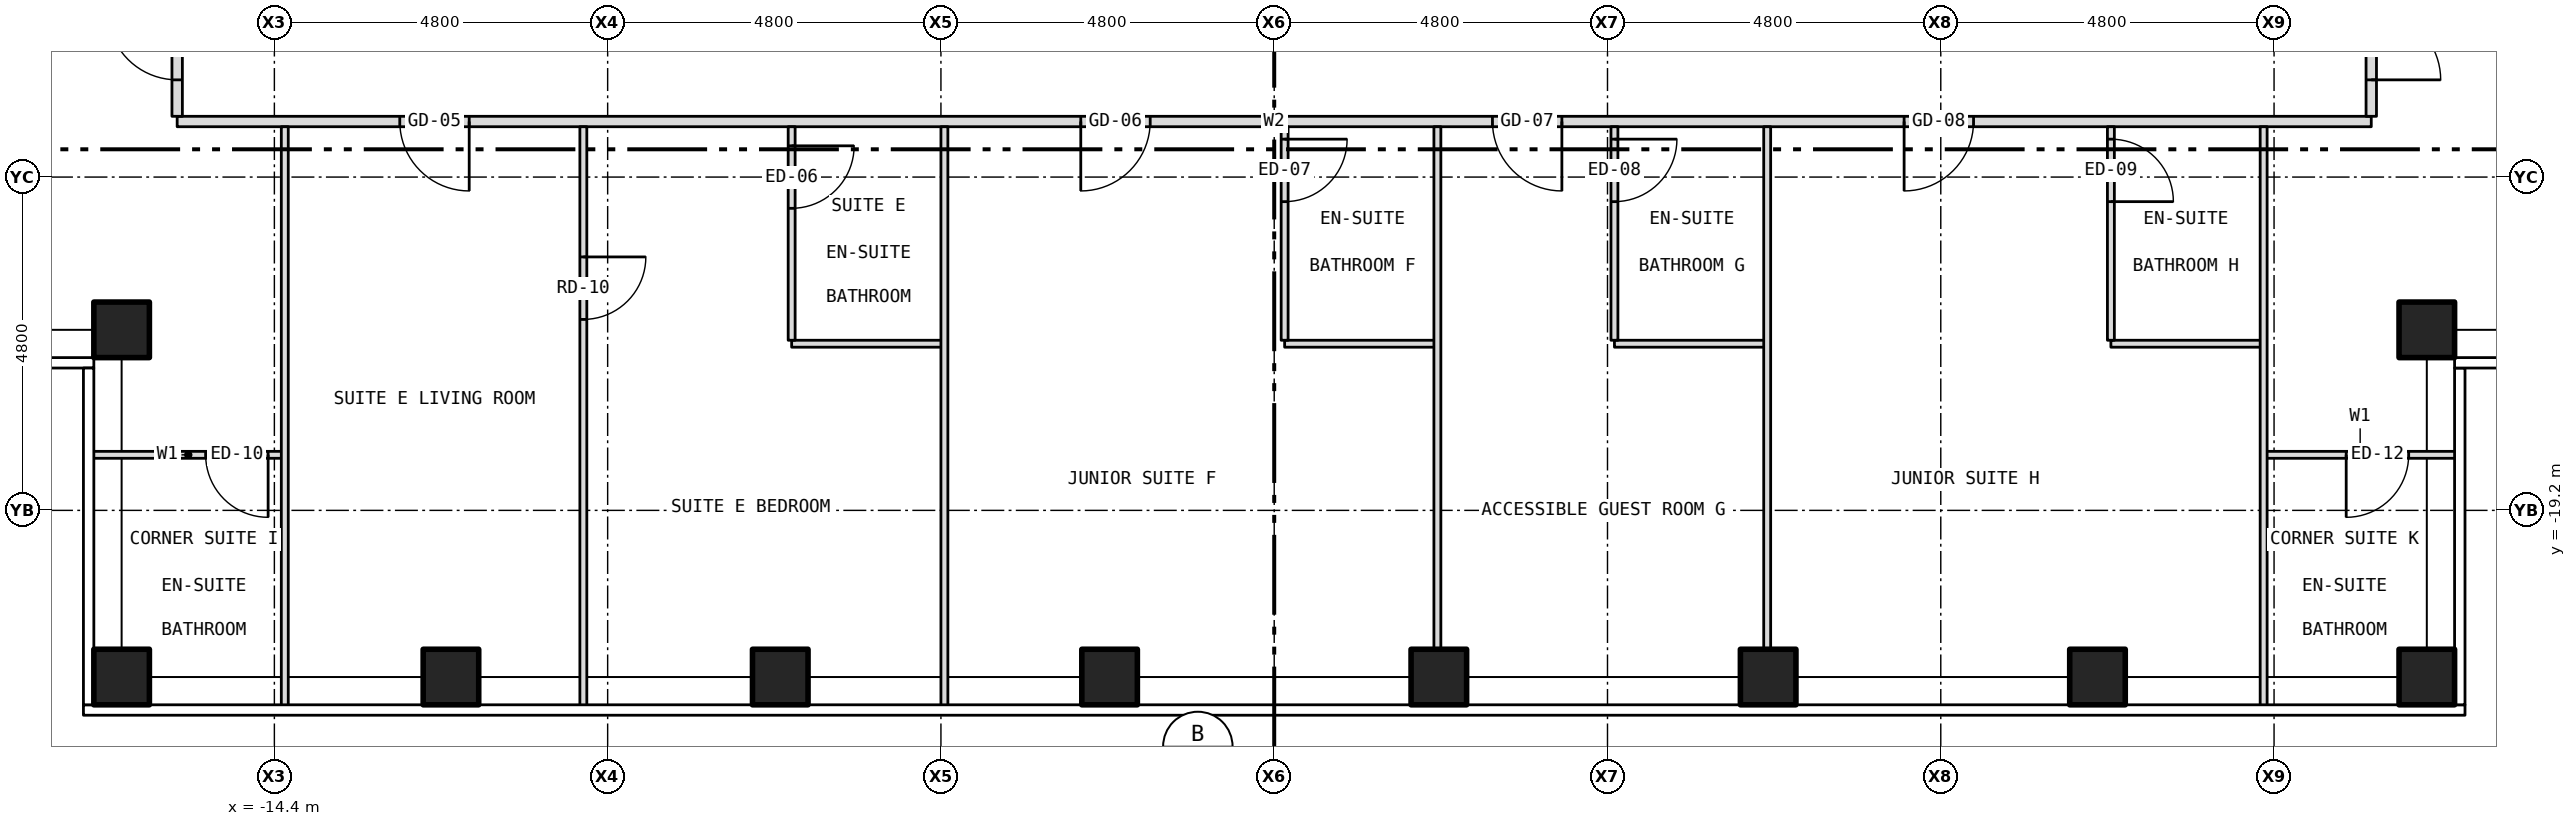
"""IFC4 building model, lengths in metres.
Left out: names, types, materials, properties, quantities, classifications, styles, units other than length and angle.
Written with IfcOpenShell. Run it as: python <this file> out.ifc"""

import sys

from ifc_helpers import new_model, si_unit, direction, frame, frame_2d, origin, origin_2d, place, context, subcontext, project, spatial, rectangle, hollow_rectangle, extrude, element, fill, save


model = new_model("IFC4")
c1 = context("Model", 3, precision=1e-05, world=origin(), true_north=direction((0.0, 1.0)))
c2 = subcontext(c1, "Body", "Model", "MODEL_VIEW")
j1 = project(units=[si_unit("LENGTHUNIT", "METRE"), si_unit("PLANEANGLEUNIT", "RADIAN")], contexts=[c1])
p1 = place(None, origin())
s1 = spatial("IfcSite", under=j1, at=p1, CompositionType="ELEMENT")
p2 = place(p1, origin())
s2 = spatial("IfcBuilding", under=s1, at=p2, CompositionType="ELEMENT")
p3 = place(p2, frame((0.0, 0.0, 162.0)))
s3 = spatial("IfcBuildingStorey", under=s2, at=p3, CompositionType="ELEMENT", Elevation=162.0)
for number, where, z_axis, x_axis in (
    (1, (-16.6, -21.6, -0.15), (0.0, 0.0, 1.0), (1.0, 0.0, 0.0)),
    (2, (-11.857, -21.6, -0.15), (0.0, 0.0, 1.0), (1.0, 0.0, 0.0)),
    (3, (-7.114, -21.6, -0.15), (0.0, 0.0, 1.0), (1.0, 0.0, 0.0)),
    (4, (-2.371, -21.6, -0.15), (0.0, 0.0, 1.0), (1.0, 0.0, 0.0)),
    (5, (2.371, -21.6, -0.15), (0.0, 0.0, 1.0), (1.0, 0.0, 0.0)),
    (6, (7.114, -21.6, -0.15), (0.0, 0.0, 1.0), (1.0, 0.0, 0.0)),
    (7, (11.857, -21.6, -0.15), (0.0, 0.0, 1.0), (1.0, 0.0, 0.0)),
    (8, (16.6, -21.6, -0.15), (0.0, 0.0, 1.0), (1.0, 0.0, 0.0)),
    (9, (-16.6, -16.6, -0.15), (0.0, 0.0, 1.0), (1.0, 0.0, 0.0)),
    (10, (16.6, -16.6, -0.15), (0.0, 0.0, 1.0), (1.0, 0.0, 0.0)),
):
    element("IfcColumn", number, at=place(p3, frame(where, z_axis=z_axis, x_axis=x_axis)), inside=s3, PredefinedType="COLUMN", context=c2, shape_type="SweptSolid", body=[
        extrude(hollow_rectangle(XDim=0.8, YDim=0.8, WallThickness=0.045, at=origin_2d()), origin(), (0.0, 0.0, 1.0), 3.5),
    ])
p4 = place(p3, frame((-17.03, -18.4, 0.0), z_axis=(0.0, 0.0, 1.0), x_axis=(1.0, 0.0, 0.0)))
e11 = element("IfcWall", 11, at=p4, inside=s3, PredefinedType="PARTITIONING", context=c2, shape_type="SweptSolid", body=[
    extrude(rectangle(XDim=2.78, YDim=0.1, at=frame_2d((1.39, 0.0))), origin(), (0.0, 0.0, 1.0), 3.35),
])
p5 = place(p4, frame((1.64, 0.0, 0.0)))
e12 = element("IfcOpeningElement", 12, at=p5, cuts=e11, PredefinedType="OPENING", context=c2, shape_type="SweptSolid", body=[
    extrude(rectangle(XDim=0.9, YDim=2.1, at=frame_2d((0.45, 1.05))), frame((0.0, 0.062, 0.0), z_axis=(0.0, -1.0, 0.0), x_axis=(1.0, 0.0, 0.0)), (0.0, 0.0, 1.0), 0.124),
])
p6 = place(p3, frame((14.25, -18.4, 0.0), z_axis=(0.0, 0.0, 1.0), x_axis=(1.0, 0.0, 0.0)))
e13 = element("IfcWall", 13, at=p6, inside=s3, PredefinedType="PARTITIONING", context=c2, shape_type="SweptSolid", body=[
    extrude(rectangle(XDim=2.78, YDim=0.1, at=frame_2d((1.39, 0.0))), origin(), (0.0, 0.0, 1.0), 3.35),
])
p7 = place(p6, frame((1.189, 0.0, 0.0)))
e14 = element("IfcOpeningElement", 14, at=p7, cuts=e13, PredefinedType="OPENING", context=c2, shape_type="SweptSolid", body=[
    extrude(rectangle(XDim=0.9, YDim=2.1, at=frame_2d((0.45, 1.05))), frame((0.0, 0.062, 0.0), z_axis=(0.0, -1.0, 0.0), x_axis=(1.0, 0.0, 0.0)), (0.0, 0.0, 1.0), 0.124),
])
p8 = place(p3, frame((-6.95, -16.8, 0.0), z_axis=(0.0, 0.0, 1.0), x_axis=(1.0, 0.0, 0.0)))
e15 = element("IfcWall", 15, at=p8, inside=s3, PredefinedType="PARTITIONING", context=c2, shape_type="SweptSolid", body=[
    extrude(rectangle(XDim=2.2, YDim=0.1, at=frame_2d((1.1, 0.0))), origin(), (0.0, 0.0, 1.0), 3.35),
])
for number, where, z_axis, x_axis in (
    (16, (0.15, -16.8, 0.0), (0.0, 0.0, 1.0), (1.0, 0.0, 0.0)),
    (17, (4.9, -16.8, 0.0), (0.0, 0.0, 1.0), (1.0, 0.0, 0.0)),
):
    element("IfcWall", number, at=place(p3, frame(where, z_axis=z_axis, x_axis=x_axis)), inside=s3, PredefinedType="PARTITIONING", context=c2, shape_type="SweptSolid", body=[
        extrude(rectangle(XDim=2.2, YDim=0.1, at=frame_2d((1.1, 0.0))), origin(), (0.0, 0.0, 1.0), 3.35),
    ])
p9 = place(p3, frame((12.05, -16.8, 0.0), z_axis=(0.0, 0.0, 1.0), x_axis=(1.0, 0.0, 0.0)))
e18 = element("IfcWall", 18, at=p9, inside=s3, PredefinedType="PARTITIONING", context=c2, shape_type="SweptSolid", body=[
    extrude(rectangle(XDim=2.2, YDim=0.1, at=frame_2d((1.1, 0.0))), origin(), (0.0, 0.0, 1.0), 3.35),
])
p10 = place(p3, frame((-15.8, -13.6, 0.0), z_axis=(0.0, 0.0, 1.0), x_axis=(1.0, 0.0, 0.0)))
e19 = element("IfcWall", 19, at=p10, inside=s3, PredefinedType="PARTITIONING", context=c2, shape_type="SweptSolid", body=[
    extrude(rectangle(XDim=31.6, YDim=0.15, at=frame_2d((15.8, 0.0))), origin(), (0.0, 0.0, 1.0), 3.35),
])
p11 = place(p10, frame((3.206, 0.0, 0.0)))
e20 = element("IfcOpeningElement", 20, at=p11, cuts=e19, PredefinedType="OPENING", context=c2, shape_type="SweptSolid", body=[
    extrude(rectangle(XDim=1.0, YDim=2.1, at=frame_2d((0.5, 1.05))), frame((0.0, 0.087, 0.0), z_axis=(0.0, -1.0, 0.0), x_axis=(1.0, 0.0, 0.0)), (0.0, 0.0, 1.0), 0.174),
])
p12 = place(p10, frame((13.014, 0.0, 0.0)))
e21 = element("IfcOpeningElement", 21, at=p12, cuts=e19, PredefinedType="OPENING", context=c2, shape_type="SweptSolid", body=[
    extrude(rectangle(XDim=1.0, YDim=2.1, at=frame_2d((0.5, 1.05))), frame((0.0, 0.087, 0.0), z_axis=(0.0, -1.0, 0.0), x_axis=(1.0, 0.0, 0.0)), (0.0, 0.0, 1.0), 0.174),
])
p13 = place(p10, frame((18.943, 0.0, 0.0)))
e22 = element("IfcOpeningElement", 22, at=p13, cuts=e19, PredefinedType="OPENING", context=c2, shape_type="SweptSolid", body=[
    extrude(rectangle(XDim=1.0, YDim=2.1, at=frame_2d((0.5, 1.05))), frame((0.0, 0.087, 0.0), z_axis=(0.0, -1.0, 0.0), x_axis=(1.0, 0.0, 0.0)), (0.0, 0.0, 1.0), 0.174),
])
p14 = place(p10, frame((24.872, 0.0, 0.0)))
e23 = element("IfcOpeningElement", 23, at=p14, cuts=e19, PredefinedType="OPENING", context=c2, shape_type="SweptSolid", body=[
    extrude(rectangle(XDim=1.0, YDim=2.1, at=frame_2d((0.5, 1.05))), frame((0.0, 0.087, 0.0), z_axis=(0.0, -1.0, 0.0), x_axis=(1.0, 0.0, 0.0)), (0.0, 0.0, 1.0), 0.174),
])
p15 = place(p3, frame((-15.8, -13.525, 0.0), z_axis=(0.0, 0.0, 1.0), x_axis=(0.0, 1.0, 0.0)))
e24 = element("IfcWall", 24, at=p15, inside=s3, PredefinedType="PARTITIONING", context=c2, shape_type="SweptSolid", body=[
    extrude(rectangle(XDim=2.605, YDim=0.15, at=frame_2d((1.302, 0.0))), origin(), (0.0, 0.0, 1.0), 3.35),
])
p16 = place(p15, frame((0.525, 0.0, 0.0)))
e25 = element("IfcOpeningElement", 25, at=p16, cuts=e24, PredefinedType="OPENING", context=c2, shape_type="SweptSolid", body=[
    extrude(rectangle(XDim=1.0, YDim=2.1, at=frame_2d((0.5, 1.05))), frame((0.0, 0.087, 0.0), z_axis=(0.0, -1.0, 0.0), x_axis=(1.0, 0.0, 0.0)), (0.0, 0.0, 1.0), 0.174),
])
p17 = place(p3, frame((-14.25, -22.03, 0.0), z_axis=(0.0, 0.0, 1.0), x_axis=(0.0, 1.0, 0.0)))
e26 = element("IfcWall", 26, at=p17, inside=s3, PredefinedType="PARTITIONING", context=c2, shape_type="SweptSolid", body=[
    extrude(rectangle(XDim=8.355, YDim=0.1, at=frame_2d((4.177, 0.0))), origin(), (0.0, 0.0, 1.0), 2.817),
])
p18 = place(p3, frame((-9.95, -22.03, 0.0), z_axis=(0.0, 0.0, 1.0), x_axis=(0.0, 1.0, 0.0)))
e27 = element("IfcWall", 27, at=p18, inside=s3, PredefinedType="PARTITIONING", context=c2, shape_type="SweptSolid", body=[
    extrude(rectangle(XDim=8.355, YDim=0.1, at=frame_2d((4.177, 0.0))), origin(), (0.0, 0.0, 1.0), 3.35),
])
p19 = place(p18, frame((5.58, 0.0, 0.0)))
e28 = element("IfcOpeningElement", 28, at=p19, cuts=e27, PredefinedType="OPENING", context=c2, shape_type="SweptSolid", body=[
    extrude(rectangle(XDim=0.9, YDim=2.1, at=frame_2d((0.45, 1.05))), frame((0.0, 0.062, 0.0), z_axis=(0.0, -1.0, 0.0), x_axis=(1.0, 0.0, 0.0)), (0.0, 0.0, 1.0), 0.124),
])
p20 = place(p3, frame((-6.95, -16.75, 0.0), z_axis=(0.0, 0.0, 1.0), x_axis=(0.0, 1.0, 0.0)))
e29 = element("IfcWall", 29, at=p20, inside=s3, PredefinedType="PARTITIONING", context=c2, shape_type="SweptSolid", body=[
    extrude(rectangle(XDim=3.075, YDim=0.1, at=frame_2d((1.538, 0.0))), origin(), (0.0, 0.0, 1.0), 3.35),
])
p21 = place(p20, frame((1.9, 0.0, 0.0)))
e30 = element("IfcOpeningElement", 30, at=p21, cuts=e29, PredefinedType="OPENING", context=c2, shape_type="SweptSolid", body=[
    extrude(rectangle(XDim=0.9, YDim=2.1, at=frame_2d((0.45, 1.05))), frame((0.0, 0.062, 0.0), z_axis=(0.0, -1.0, 0.0), x_axis=(1.0, 0.0, 0.0)), (0.0, 0.0, 1.0), 0.124),
])
p22 = place(p3, frame((-4.75, -22.03, 0.0), z_axis=(0.0, 0.0, 1.0), x_axis=(0.0, 1.0, 0.0)))
e31 = element("IfcWall", 31, at=p22, inside=s3, PredefinedType="PARTITIONING", context=c2, shape_type="SweptSolid", body=[
    extrude(rectangle(XDim=8.355, YDim=0.1, at=frame_2d((4.177, 0.0))), origin(), (0.0, 0.0, 1.0), 2.817),
])
p23 = place(p3, frame((0.15, -16.75, 0.0), z_axis=(0.0, 0.0, 1.0), x_axis=(0.0, 1.0, 0.0)))
e32 = element("IfcWall", 32, at=p23, inside=s3, PredefinedType="PARTITIONING", context=c2, shape_type="SweptSolid", body=[
    extrude(rectangle(XDim=3.075, YDim=0.1, at=frame_2d((1.538, 0.0))), origin(), (0.0, 0.0, 1.0), 2.728),
])
p24 = place(p23, frame((1.996, 0.0, 0.0)))
e33 = element("IfcOpeningElement", 33, at=p24, cuts=e32, PredefinedType="OPENING", context=c2, shape_type="SweptSolid", body=[
    extrude(rectangle(XDim=0.9, YDim=2.1, at=frame_2d((0.45, 1.05))), frame((0.0, 0.062, 0.0), z_axis=(0.0, -1.0, 0.0), x_axis=(1.0, 0.0, 0.0)), (0.0, 0.0, 1.0), 0.124),
])
p25 = place(p3, frame((2.35, -21.48, 0.0), z_axis=(0.0, 0.0, 1.0), x_axis=(0.0, 1.0, 0.0)))
e34 = element("IfcWall", 34, at=p25, inside=s3, PredefinedType="PARTITIONING", context=c2, shape_type="SweptSolid", body=[
    extrude(rectangle(XDim=7.805, YDim=0.1, at=frame_2d((3.902, 0.0))), origin(), (0.0, 0.0, 1.0), 3.35),
])
p26 = place(p3, frame((4.9, -16.75, 0.0), z_axis=(0.0, 0.0, 1.0), x_axis=(0.0, 1.0, 0.0)))
e35 = element("IfcWall", 35, at=p26, inside=s3, PredefinedType="PARTITIONING", context=c2, shape_type="SweptSolid", body=[
    extrude(rectangle(XDim=3.075, YDim=0.1, at=frame_2d((1.538, 0.0))), origin(), (0.0, 0.0, 1.0), 2.817),
])
p27 = place(p26, frame((1.996, 0.0, 0.0)))
e36 = element("IfcOpeningElement", 36, at=p27, cuts=e35, PredefinedType="OPENING", context=c2, shape_type="SweptSolid", body=[
    extrude(rectangle(XDim=0.9, YDim=2.1, at=frame_2d((0.45, 1.05))), frame((0.0, 0.062, 0.0), z_axis=(0.0, -1.0, 0.0), x_axis=(1.0, 0.0, 0.0)), (0.0, 0.0, 1.0), 0.124),
])
p28 = place(p3, frame((7.1, -21.48, 0.0), z_axis=(0.0, 0.0, 1.0), x_axis=(0.0, 1.0, 0.0)))
e37 = element("IfcWall", 37, at=p28, inside=s3, PredefinedType="PARTITIONING", context=c2, shape_type="SweptSolid", body=[
    extrude(rectangle(XDim=7.805, YDim=0.1, at=frame_2d((3.902, 0.0))), origin(), (0.0, 0.0, 1.0), 3.35),
])
p29 = place(p3, frame((12.05, -16.75, 0.0), z_axis=(0.0, 0.0, 1.0), x_axis=(0.0, 1.0, 0.0)))
e38 = element("IfcWall", 38, at=p29, inside=s3, PredefinedType="PARTITIONING", context=c2, shape_type="SweptSolid", body=[
    extrude(rectangle(XDim=3.075, YDim=0.1, at=frame_2d((1.538, 0.0))), origin(), (0.0, 0.0, 1.0), 3.35),
])
p30 = place(p29, frame((1.996, 0.0, 0.0)))
e39 = element("IfcOpeningElement", 39, at=p30, cuts=e38, PredefinedType="OPENING", context=c2, shape_type="SweptSolid", body=[
    extrude(rectangle(XDim=0.9, YDim=2.1, at=frame_2d((0.45, 1.05))), frame((0.0, 0.062, 0.0), z_axis=(0.0, -1.0, 0.0), x_axis=(1.0, 0.0, 0.0)), (0.0, 0.0, 1.0), 0.124),
])
p31 = place(p3, frame((14.25, -22.03, 0.0), z_axis=(0.0, 0.0, 1.0), x_axis=(0.0, 1.0, 0.0)))
e40 = element("IfcWall", 40, at=p31, inside=s3, PredefinedType="PARTITIONING", context=c2, shape_type="SweptSolid", body=[
    extrude(rectangle(XDim=8.355, YDim=0.1, at=frame_2d((4.177, 0.0))), origin(), (0.0, 0.0, 1.0), 2.817),
])
p32 = place(p3, frame((15.8, -13.525, 0.0), z_axis=(0.0, 0.0, 1.0), x_axis=(0.0, 1.0, 0.0)))
e41 = element("IfcWall", 41, at=p32, inside=s3, PredefinedType="PARTITIONING", context=c2, shape_type="SweptSolid", body=[
    extrude(rectangle(XDim=2.605, YDim=0.15, at=frame_2d((1.302, 0.0))), origin(), (0.0, 0.0, 1.0), 3.35),
])
p33 = place(p32, frame((0.525, 0.0, 0.0)))
e42 = element("IfcOpeningElement", 42, at=p33, cuts=e41, PredefinedType="OPENING", context=c2, shape_type="SweptSolid", body=[
    extrude(rectangle(XDim=1.0, YDim=2.1, at=frame_2d((0.5, 1.05))), frame((0.0, 0.087, 0.0), z_axis=(0.0, -1.0, 0.0), x_axis=(1.0, 0.0, 0.0)), (0.0, 0.0, 1.0), 0.174),
])
p34 = place(p11, origin())
e43 = element("IfcDoor", 43, at=p34, inside=s3, OperationType="SINGLE_SWING_RIGHT", PredefinedType="DOOR", context=c2, shape_type="SweptSolid", body=[
    extrude(rectangle(XDim=1.0, YDim=2.1, at=frame_2d((0.5, 1.05))), frame((0.0, 0.025, 0.0), z_axis=(0.0, -1.0, 0.0), x_axis=(1.0, 0.0, 0.0)), (0.0, 0.0, 1.0), 0.05),
])
fill(e20, e43)
p35 = place(p19, origin())
e44 = element("IfcDoor", 44, at=p35, inside=s3, OperationType="SINGLE_SWING_RIGHT", PredefinedType="DOOR", context=c2, shape_type="SweptSolid", body=[
    extrude(rectangle(XDim=0.9, YDim=2.1, at=frame_2d((0.45, 1.05))), frame((0.0, 0.025, 0.0), z_axis=(0.0, -1.0, 0.0), x_axis=(1.0, 0.0, 0.0)), (0.0, 0.0, 1.0), 0.05),
])
fill(e28, e44)
p36 = place(p21, origin())
e45 = element("IfcDoor", 45, at=p36, inside=s3, OperationType="SINGLE_SWING_RIGHT", PredefinedType="DOOR", context=c2, shape_type="SweptSolid", body=[
    extrude(rectangle(XDim=0.9, YDim=2.1, at=frame_2d((0.45, 1.05))), frame((0.0, 0.025, 0.0), z_axis=(0.0, -1.0, 0.0), x_axis=(1.0, 0.0, 0.0)), (0.0, 0.0, 1.0), 0.05),
])
fill(e30, e45)
p37 = place(p12, origin())
e46 = element("IfcDoor", 46, at=p37, inside=s3, OperationType="SINGLE_SWING_LEFT", PredefinedType="DOOR", context=c2, shape_type="SweptSolid", body=[
    extrude(rectangle(XDim=1.0, YDim=2.1, at=frame_2d((0.5, 1.05))), frame((0.0, 0.025, 0.0), z_axis=(0.0, -1.0, 0.0), x_axis=(1.0, 0.0, 0.0)), (0.0, 0.0, 1.0), 0.05),
])
fill(e21, e46)
p38 = place(p24, origin())
e47 = element("IfcDoor", 47, at=p38, inside=s3, OperationType="SINGLE_SWING_RIGHT", PredefinedType="DOOR", context=c2, shape_type="SweptSolid", body=[
    extrude(rectangle(XDim=0.9, YDim=2.1, at=frame_2d((0.45, 1.05))), frame((0.0, 0.025, 0.0), z_axis=(0.0, -1.0, 0.0), x_axis=(1.0, 0.0, 0.0)), (0.0, 0.0, 1.0), 0.05),
])
fill(e33, e47)
p39 = place(p13, origin())
e48 = element("IfcDoor", 48, at=p39, inside=s3, OperationType="SINGLE_SWING_RIGHT", PredefinedType="DOOR", context=c2, shape_type="SweptSolid", body=[
    extrude(rectangle(XDim=1.0, YDim=2.1, at=frame_2d((0.5, 1.05))), frame((0.0, 0.025, 0.0), z_axis=(0.0, -1.0, 0.0), x_axis=(1.0, 0.0, 0.0)), (0.0, 0.0, 1.0), 0.05),
])
fill(e22, e48)
p40 = place(p27, origin())
e49 = element("IfcDoor", 49, at=p40, inside=s3, OperationType="SINGLE_SWING_RIGHT", PredefinedType="DOOR", context=c2, shape_type="SweptSolid", body=[
    extrude(rectangle(XDim=0.9, YDim=2.1, at=frame_2d((0.45, 1.05))), frame((0.0, 0.025, 0.0), z_axis=(0.0, -1.0, 0.0), x_axis=(1.0, 0.0, 0.0)), (0.0, 0.0, 1.0), 0.05),
])
fill(e36, e49)
p41 = place(p14, origin())
e50 = element("IfcDoor", 50, at=p41, inside=s3, OperationType="SINGLE_SWING_LEFT", PredefinedType="DOOR", context=c2, shape_type="SweptSolid", body=[
    extrude(rectangle(XDim=1.0, YDim=2.1, at=frame_2d((0.5, 1.05))), frame((0.0, 0.025, 0.0), z_axis=(0.0, -1.0, 0.0), x_axis=(1.0, 0.0, 0.0)), (0.0, 0.0, 1.0), 0.05),
])
fill(e23, e50)
p42 = place(p30, origin())
e51 = element("IfcDoor", 51, at=p42, inside=s3, OperationType="SINGLE_SWING_LEFT", PredefinedType="DOOR", context=c2, shape_type="SweptSolid", body=[
    extrude(rectangle(XDim=0.9, YDim=2.1, at=frame_2d((0.45, 1.05))), frame((0.0, 0.025, 0.0), z_axis=(0.0, -1.0, 0.0), x_axis=(1.0, 0.0, 0.0)), (0.0, 0.0, 1.0), 0.05),
])
fill(e39, e51)
p43 = place(p5, origin())
e52 = element("IfcDoor", 52, at=p43, inside=s3, OperationType="SINGLE_SWING_RIGHT", PredefinedType="DOOR", context=c2, shape_type="SweptSolid", body=[
    extrude(rectangle(XDim=0.9, YDim=2.1, at=frame_2d((0.45, 1.05))), frame((0.0, 0.025, 0.0), z_axis=(0.0, -1.0, 0.0), x_axis=(1.0, 0.0, 0.0)), (0.0, 0.0, 1.0), 0.05),
])
fill(e12, e52)
p44 = place(p16, origin())
e53 = element("IfcDoor", 53, at=p44, inside=s3, OperationType="SINGLE_SWING_RIGHT", PredefinedType="DOOR", context=c2, shape_type="SweptSolid", body=[
    extrude(rectangle(XDim=1.0, YDim=2.1, at=frame_2d((0.5, 1.05))), frame((0.0, 0.025, 0.0), z_axis=(0.0, -1.0, 0.0), x_axis=(1.0, 0.0, 0.0)), (0.0, 0.0, 1.0), 0.05),
])
fill(e25, e53)
p45 = place(p7, origin())
e54 = element("IfcDoor", 54, at=p45, inside=s3, OperationType="SINGLE_SWING_LEFT", PredefinedType="DOOR", context=c2, shape_type="SweptSolid", body=[
    extrude(rectangle(XDim=0.9, YDim=2.1, at=frame_2d((0.45, 1.05))), frame((0.0, 0.025, 0.0), z_axis=(0.0, -1.0, 0.0), x_axis=(1.0, 0.0, 0.0)), (0.0, 0.0, 1.0), 0.05),
])
fill(e14, e54)
p46 = place(p33, origin())
e55 = element("IfcDoor", 55, at=p46, inside=s3, OperationType="SINGLE_SWING_LEFT", PredefinedType="DOOR", context=c2, shape_type="SweptSolid", body=[
    extrude(rectangle(XDim=1.0, YDim=2.1, at=frame_2d((0.5, 1.05))), frame((0.0, 0.025, 0.0), z_axis=(0.0, -1.0, 0.0), x_axis=(1.0, 0.0, 0.0)), (0.0, 0.0, 1.0), 0.05),
])
fill(e42, e55)
save(model, sys.argv[1])
